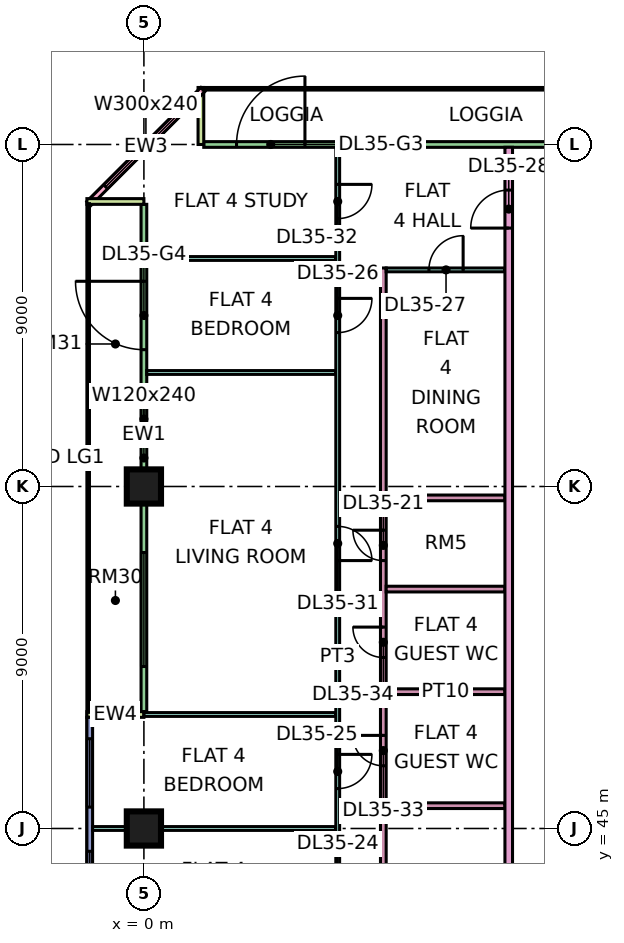
"""IFC4 building model, lengths in metres.
Left out: names, types, materials, properties, quantities, classifications, styles, units other than length and angle.
Written with IfcOpenShell. Run it as: python <this file> out.ifc"""

import sys

from ifc_helpers import new_model, si_unit, direction, frame, frame_2d, origin, origin_2d, place, context, subcontext, project, spatial, rectangle, extrude, element, fill, save


model = new_model("IFC4")
c1 = context("Model", 3, precision=1e-05, world=origin(), true_north=direction((0.0, 1.0)))
c2 = subcontext(c1, "Body", "Model", "MODEL_VIEW")
j1 = project(units=[si_unit("LENGTHUNIT", "METRE"), si_unit("PLANEANGLEUNIT", "RADIAN")], contexts=[c1])
p1 = place(None, origin())
s1 = spatial("IfcSite", under=j1, at=p1, CompositionType="ELEMENT")
p2 = place(p1, origin())
s2 = spatial("IfcBuilding", under=s1, at=p2, CompositionType="ELEMENT")
p3 = place(p2, frame((0.0, 0.0, 157.4)))
s3 = spatial("IfcBuildingStorey", under=s2, at=p3, CompositionType="ELEMENT", Elevation=157.4)
for number, where, z_axis, x_axis in (
    (1, (0.0, 45.0, 0.0), (0.0, 0.0, 1.0), (1.0, 0.0, 0.0)),
    (2, (0.0, 54.0, 0.0), (0.0, 0.0, 1.0), (1.0, 0.0, 0.0)),
):
    element("IfcColumn", number, at=place(p3, frame(where, z_axis=z_axis, x_axis=x_axis)), inside=s3, PredefinedType="COLUMN", context=c2, shape_type="SweptSolid", body=[
        extrude(rectangle(XDim=0.9, YDim=0.9, at=origin_2d()), origin(), (0.0, 0.0, 1.0), 3.75),
    ])
p4 = place(p3, frame((11.925, 63.0, 0.0), z_axis=(0.0, 0.0, 1.0), x_axis=(-1.0, 0.0, 0.0)))
e3 = element("IfcWall", 3, at=p4, inside=s3, PredefinedType="SOLIDWALL", context=c2, shape_type="SweptSolid", body=[
    extrude(rectangle(XDim=10.35, YDim=0.15, at=frame_2d((5.175, 0.0))), origin(), (0.0, 0.0, 1.0), 3.35),
])
p5 = place(p4, frame((7.688, 0.0, 0.0)))
e4 = element("IfcOpeningElement", 4, at=p5, cuts=e3, PredefinedType="OPENING", context=c2, shape_type="SweptSolid", body=[
    extrude(rectangle(XDim=1.8, YDim=2.4, at=frame_2d((0.9, 1.2))), frame((0.0, 0.085, 0.0), z_axis=(0.0, -1.0, 0.0), x_axis=(1.0, 0.0, 0.0)), (0.0, 0.0, 1.0), 0.17),
])
p6 = place(p3, frame((1.5, 64.5, 0.0), z_axis=(0.0, 0.0, 1.0), x_axis=(0.0, -1.0, 0.0)))
e5 = element("IfcWall", 5, at=p6, inside=s3, PredefinedType="SOLIDWALL", context=c2, shape_type="SweptSolid", body=[
    extrude(rectangle(XDim=1.5, YDim=0.15, at=frame_2d((0.75, 0.0))), origin(), (0.0, 0.0, 1.0), 3.35),
])
p7 = place(p3, frame((1.553, 64.447, 0.0), z_axis=(0.0, 0.0, 1.0), x_axis=(-0.707106781187, -0.707106781187, 0.0)))
e6 = element("IfcWall", 6, at=p7, inside=s3, PredefinedType="SOLIDWALL", context=c2, shape_type="SweptSolid", body=[
    extrude(rectangle(XDim=4.243, YDim=0.15, at=frame_2d((2.121, 0.0))), origin(), (0.0, 0.0, 1.0), 3.35),
])
p8 = place(p7, frame((0.621, 0.0, 0.45)))
e7 = element("IfcOpeningElement", 7, at=p8, cuts=e6, PredefinedType="OPENING", context=c2, shape_type="SweptSolid", body=[
    extrude(rectangle(XDim=3.0, YDim=2.4, at=frame_2d((1.5, 1.2))), frame((0.0, 0.085, 0.0), z_axis=(0.0, -1.0, 0.0), x_axis=(1.0, 0.0, 0.0)), (0.0, 0.0, 1.0), 0.17),
])
p9 = place(p3, frame((0.0, 61.425, 0.0), z_axis=(0.0, 0.0, 1.0), x_axis=(0.0, -1.0, 0.0)))
e8 = element("IfcWall", 8, at=p9, inside=s3, PredefinedType="SOLIDWALL", context=c2, shape_type="SweptSolid", body=[
    extrude(rectangle(XDim=13.35, YDim=0.15, at=frame_2d((6.675, 0.0))), origin(), (0.0, 0.0, 1.0), 3.35),
])
p10 = place(p9, frame((2.025, 0.0, 0.0)))
e9 = element("IfcOpeningElement", 9, at=p10, cuts=e8, PredefinedType="OPENING", context=c2, shape_type="SweptSolid", body=[
    extrude(rectangle(XDim=1.8, YDim=2.4, at=frame_2d((0.9, 1.2))), frame((0.0, 0.085, 0.0), z_axis=(0.0, -1.0, 0.0), x_axis=(1.0, 0.0, 0.0)), (0.0, 0.0, 1.0), 0.17),
])
p11 = place(p9, frame((5.05, 0.0, 0.45)))
e10 = element("IfcOpeningElement", 10, at=p11, cuts=e8, PredefinedType="OPENING", context=c2, shape_type="SweptSolid", body=[
    extrude(rectangle(XDim=1.2, YDim=2.4, at=frame_2d((0.6, 1.2))), frame((0.0, 0.085, 0.0), z_axis=(0.0, -1.0, 0.0), x_axis=(1.0, 0.0, 0.0)), (0.0, 0.0, 1.0), 0.17),
])
p12 = place(p9, frame((9.163, 0.0, 0.45)))
e11 = element("IfcOpeningElement", 11, at=p12, cuts=e8, PredefinedType="OPENING", context=c2, shape_type="SweptSolid", body=[
    extrude(rectangle(XDim=3.0, YDim=2.4, at=frame_2d((1.5, 1.2))), frame((0.0, 0.085, 0.0), z_axis=(0.0, -1.0, 0.0), x_axis=(1.0, 0.0, 0.0)), (0.0, 0.0, 1.0), 0.17),
])
for number, where, z_axis, x_axis in (
    (12, (-1.5, 61.5, 0.0), (0.0, 0.0, 1.0), (1.0, 0.0, 0.0)),
    (13, (-1.5, 48.0, 0.0), (0.0, 0.0, 1.0), (1.0, 0.0, 0.0)),
):
    element("IfcWall", number, at=place(p3, frame(where, z_axis=z_axis, x_axis=x_axis)), inside=s3, PredefinedType="SOLIDWALL", context=c2, shape_type="SweptSolid", body=[
        extrude(rectangle(XDim=1.5, YDim=0.15, at=frame_2d((0.75, 0.0))), origin(), (0.0, 0.0, 1.0), 3.35),
    ])
p13 = place(p3, frame((-1.425, 47.925, 0.0), z_axis=(0.0, 0.0, 1.0), x_axis=(0.0, -1.0, 0.0)))
e14 = element("IfcWall", 14, at=p13, inside=s3, PredefinedType="SOLIDWALL", context=c2, shape_type="SweptSolid", body=[
    extrude(rectangle(XDim=11.85, YDim=0.15, at=frame_2d((5.925, 0.0))), origin(), (0.0, 0.0, 1.0), 3.35),
])
p14 = place(p13, frame((0.562, 0.0, 0.45)))
e15 = element("IfcOpeningElement", 15, at=p14, cuts=e14, PredefinedType="OPENING", context=c2, shape_type="SweptSolid", body=[
    extrude(rectangle(XDim=1.8, YDim=2.4, at=frame_2d((0.9, 1.2))), frame((0.0, 0.085, 0.0), z_axis=(0.0, -1.0, 0.0), x_axis=(1.0, 0.0, 0.0)), (0.0, 0.0, 1.0), 0.17),
])
p15 = place(p13, frame((3.525, 0.0, 0.45)))
e16 = element("IfcOpeningElement", 16, at=p15, cuts=e14, PredefinedType="OPENING", context=c2, shape_type="SweptSolid", body=[
    extrude(rectangle(XDim=1.8, YDim=2.4, at=frame_2d((0.9, 1.2))), frame((0.0, 0.085, 0.0), z_axis=(0.0, -1.0, 0.0), x_axis=(1.0, 0.0, 0.0)), (0.0, 0.0, 1.0), 0.17),
])
p16 = place(p13, frame((6.525, 0.0, 0.45)))
e17 = element("IfcOpeningElement", 17, at=p16, cuts=e14, PredefinedType="OPENING", context=c2, shape_type="SweptSolid", body=[
    extrude(rectangle(XDim=1.8, YDim=2.4, at=frame_2d((0.9, 1.2))), frame((0.0, 0.085, 0.0), z_axis=(0.0, -1.0, 0.0), x_axis=(1.0, 0.0, 0.0)), (0.0, 0.0, 1.0), 0.17),
])
p17 = place(p13, frame((9.488, 0.0, 0.45)))
e18 = element("IfcOpeningElement", 18, at=p17, cuts=e14, PredefinedType="OPENING", context=c2, shape_type="SweptSolid", body=[
    extrude(rectangle(XDim=1.8, YDim=2.4, at=frame_2d((0.9, 1.2))), frame((0.0, 0.085, 0.0), z_axis=(0.0, -1.0, 0.0), x_axis=(1.0, 0.0, 0.0)), (0.0, 0.0, 1.0), 0.17),
])
p18 = place(p3, frame((-1.351, 45.0, 0.0), z_axis=(0.0, 0.0, 1.0), x_axis=(1.0, 0.0, 0.0)))
e19 = element("IfcWall", 19, at=p18, inside=s3, PredefinedType="PARTITIONING", context=c2, shape_type="SweptSolid", body=[
    extrude(rectangle(XDim=6.401, YDim=0.1, at=frame_2d((3.201, 0.0))), origin(), (0.0, 0.0, 1.0), 3.35),
])
p19 = place(p3, frame((0.0, 48.0, 0.0), z_axis=(0.0, 0.0, 1.0), x_axis=(1.0, 0.0, 0.0)))
e20 = element("IfcWall", 20, at=p19, inside=s3, PredefinedType="PARTITIONING", context=c2, shape_type="SweptSolid", body=[
    extrude(rectangle(XDim=5.05, YDim=0.1, at=frame_2d((2.525, 0.0))), origin(), (0.0, 0.0, 1.0), 3.35),
])
for number, where, z_axis, x_axis in (
    (21, (0.074, 57.0, 0.0), (0.0, 0.0, 1.0), (1.0, 0.0, 0.0)),
    (22, (0.074, 60.0, 0.0), (0.0, 0.0, 1.0), (1.0, 0.0, 0.0)),
):
    element("IfcWall", number, at=place(p3, frame(where, z_axis=z_axis, x_axis=x_axis)), inside=s3, PredefinedType="PARTITIONING", context=c2, shape_type="SweptSolid", body=[
        extrude(rectangle(XDim=4.976, YDim=0.1, at=frame_2d((2.488, 0.0))), origin(), (0.0, 0.0, 1.0), 3.35),
    ])
p20 = place(p3, frame((5.1, 36.1, 0.0), z_axis=(0.0, 0.0, 1.0), x_axis=(0.0, 1.0, 0.0)))
e23 = element("IfcWall", 23, at=p20, inside=s3, PredefinedType="PARTITIONING", context=c2, shape_type="SweptSolid", body=[
    extrude(rectangle(XDim=26.826, YDim=0.1, at=frame_2d((13.413, 0.0))), origin(), (0.0, 0.0, 1.0), 3.35),
])
p21 = place(p20, frame((0.95, 0.0, 0.0)))
e24 = element("IfcOpeningElement", 24, at=p21, cuts=e23, PredefinedType="OPENING", context=c2, shape_type="SweptSolid", body=[
    extrude(rectangle(XDim=0.9, YDim=2.1, at=frame_2d((0.45, 1.05))), frame((0.0, 0.06, 0.0), z_axis=(0.0, -1.0, 0.0), x_axis=(1.0, 0.0, 0.0)), (0.0, 0.0, 1.0), 0.12),
])
p22 = place(p20, frame((3.95, 0.0, 0.0)))
e25 = element("IfcOpeningElement", 25, at=p22, cuts=e23, PredefinedType="OPENING", context=c2, shape_type="SweptSolid", body=[
    extrude(rectangle(XDim=0.9, YDim=2.1, at=frame_2d((0.45, 1.05))), frame((0.0, 0.06, 0.0), z_axis=(0.0, -1.0, 0.0), x_axis=(1.0, 0.0, 0.0)), (0.0, 0.0, 1.0), 0.12),
])
p23 = place(p20, frame((6.95, 0.0, 0.0)))
e26 = element("IfcOpeningElement", 26, at=p23, cuts=e23, PredefinedType="OPENING", context=c2, shape_type="SweptSolid", body=[
    extrude(rectangle(XDim=0.9, YDim=2.1, at=frame_2d((0.45, 1.05))), frame((0.0, 0.06, 0.0), z_axis=(0.0, -1.0, 0.0), x_axis=(1.0, 0.0, 0.0)), (0.0, 0.0, 1.0), 0.12),
])
p24 = place(p20, frame((9.95, 0.0, 0.0)))
e27 = element("IfcOpeningElement", 27, at=p24, cuts=e23, PredefinedType="OPENING", context=c2, shape_type="SweptSolid", body=[
    extrude(rectangle(XDim=0.9, YDim=2.1, at=frame_2d((0.45, 1.05))), frame((0.0, 0.06, 0.0), z_axis=(0.0, -1.0, 0.0), x_axis=(1.0, 0.0, 0.0)), (0.0, 0.0, 1.0), 0.12),
])
p25 = place(p20, frame((21.95, 0.0, 0.0)))
e28 = element("IfcOpeningElement", 28, at=p25, cuts=e23, PredefinedType="OPENING", context=c2, shape_type="SweptSolid", body=[
    extrude(rectangle(XDim=0.9, YDim=2.1, at=frame_2d((0.45, 1.05))), frame((0.0, 0.06, 0.0), z_axis=(0.0, -1.0, 0.0), x_axis=(1.0, 0.0, 0.0)), (0.0, 0.0, 1.0), 0.12),
])
p26 = place(p20, frame((15.95, 0.0, 0.0)))
e29 = element("IfcOpeningElement", 29, at=p26, cuts=e23, PredefinedType="OPENING", context=c2, shape_type="SweptSolid", body=[
    extrude(rectangle(XDim=0.9, YDim=2.1, at=frame_2d((0.45, 1.05))), frame((0.0, 0.06, 0.0), z_axis=(0.0, -1.0, 0.0), x_axis=(1.0, 0.0, 0.0)), (0.0, 0.0, 1.0), 0.12),
])
p27 = place(p20, frame((24.95, 0.0, 0.0)))
e30 = element("IfcOpeningElement", 30, at=p27, cuts=e23, PredefinedType="OPENING", context=c2, shape_type="SweptSolid", body=[
    extrude(rectangle(XDim=0.9, YDim=2.1, at=frame_2d((0.45, 1.05))), frame((0.0, 0.06, 0.0), z_axis=(0.0, -1.0, 0.0), x_axis=(1.0, 0.0, 0.0)), (0.0, 0.0, 1.0), 0.12),
])
p28 = place(p3, frame((6.3, 36.1, 0.0), z_axis=(0.0, 0.0, 1.0), x_axis=(0.0, 1.0, 0.0)))
e31 = element("IfcWall", 31, at=p28, inside=s3, PredefinedType="PARTITIONING", context=c2, shape_type="SweptSolid", body=[
    extrude(rectangle(XDim=23.65, YDim=0.15, at=frame_2d((11.825, 0.0))), origin(), (0.0, 0.0, 1.0), 3.35),
])
p29 = place(p28, frame((15.95, 0.0, 0.0)))
e32 = element("IfcOpeningElement", 32, at=p29, cuts=e31, PredefinedType="OPENING", context=c2, shape_type="SweptSolid", body=[
    extrude(rectangle(XDim=0.8, YDim=2.1, at=frame_2d((0.4, 1.05))), frame((0.0, 0.085, 0.0), z_axis=(0.0, -1.0, 0.0), x_axis=(1.0, 0.0, 0.0)), (0.0, 0.0, 1.0), 0.17),
])
p30 = place(p28, frame((5.75, 0.0, 0.0)))
e33 = element("IfcOpeningElement", 33, at=p30, cuts=e31, PredefinedType="OPENING", context=c2, shape_type="SweptSolid", body=[
    extrude(rectangle(XDim=0.9, YDim=2.1, at=frame_2d((0.45, 1.05))), frame((0.0, 0.085, 0.0), z_axis=(0.0, -1.0, 0.0), x_axis=(1.0, 0.0, 0.0)), (0.0, 0.0, 1.0), 0.17),
])
p31 = place(p28, frame((0.95, 0.0, 0.0)))
e34 = element("IfcOpeningElement", 34, at=p31, cuts=e31, PredefinedType="OPENING", context=c2, shape_type="SweptSolid", body=[
    extrude(rectangle(XDim=0.8, YDim=2.1, at=frame_2d((0.4, 1.05))), frame((0.0, 0.085, 0.0), z_axis=(0.0, -1.0, 0.0), x_axis=(1.0, 0.0, 0.0)), (0.0, 0.0, 1.0), 0.17),
])
p32 = place(p28, frame((10.55, 0.0, 0.0)))
e35 = element("IfcOpeningElement", 35, at=p32, cuts=e31, PredefinedType="OPENING", context=c2, shape_type="SweptSolid", body=[
    extrude(rectangle(XDim=0.8, YDim=2.1, at=frame_2d((0.4, 1.05))), frame((0.0, 0.085, 0.0), z_axis=(0.0, -1.0, 0.0), x_axis=(1.0, 0.0, 0.0)), (0.0, 0.0, 1.0), 0.17),
])
p33 = place(p28, frame((13.4, 0.0, 0.0)))
e36 = element("IfcOpeningElement", 36, at=p33, cuts=e31, PredefinedType="OPENING", context=c2, shape_type="SweptSolid", body=[
    extrude(rectangle(XDim=0.8, YDim=2.1, at=frame_2d((0.4, 1.05))), frame((0.0, 0.085, 0.0), z_axis=(0.0, -1.0, 0.0), x_axis=(1.0, 0.0, 0.0)), (0.0, 0.0, 1.0), 0.17),
])
for number, where, z_axis, x_axis in (
    (37, (6.375, 45.6, 0.0), (0.0, 0.0, 1.0), (1.0, 0.0, 0.0)),
    (38, (6.375, 48.6, 0.0), (0.0, 0.0, 1.0), (1.0, 0.0, 0.0)),
    (39, (6.375, 51.3, 0.0), (0.0, 0.0, 1.0), (1.0, 0.0, 0.0)),
    (40, (6.375, 53.7, 0.0), (0.0, 0.0, 1.0), (1.0, 0.0, 0.0)),
):
    element("IfcWall", number, at=place(p3, frame(where, z_axis=z_axis, x_axis=x_axis)), inside=s3, PredefinedType="PARTITIONING", context=c2, shape_type="SweptSolid", body=[
        extrude(rectangle(XDim=3.125, YDim=0.15, at=frame_2d((1.562, 0.0))), origin(), (0.0, 0.0, 1.0), 3.35),
    ])
p34 = place(p3, frame((6.375, 59.7, 0.0), z_axis=(0.0, 0.0, 1.0), x_axis=(1.0, 0.0, 0.0)))
e41 = element("IfcWall", 41, at=p34, inside=s3, PredefinedType="PARTITIONING", context=c2, shape_type="SweptSolid", body=[
    extrude(rectangle(XDim=3.125, YDim=0.1, at=frame_2d((1.562, 0.0))), origin(), (0.0, 0.0, 1.0), 3.35),
])
p35 = place(p34, frame((1.125, 0.0, 0.0)))
e42 = element("IfcOpeningElement", 42, at=p35, cuts=e41, PredefinedType="OPENING", context=c2, shape_type="SweptSolid", body=[
    extrude(rectangle(XDim=0.9, YDim=2.1, at=frame_2d((0.45, 1.05))), frame((0.0, 0.06, 0.0), z_axis=(0.0, -1.0, 0.0), x_axis=(1.0, 0.0, 0.0)), (0.0, 0.0, 1.0), 0.12),
])
p36 = place(p3, frame((9.6, 20.0, 0.0), z_axis=(0.0, 0.0, 1.0), x_axis=(0.0, 1.0, 0.0)))
e43 = element("IfcWall", 43, at=p36, inside=s3, PredefinedType="PARTITIONING", context=c2, shape_type="SweptSolid", body=[
    extrude(rectangle(XDim=42.926, YDim=0.2, at=frame_2d((21.463, 0.0))), origin(), (0.0, 0.0, 1.0), 3.35),
])
p37 = place(p36, frame((40.8, 0.0, 0.0)))
e44 = element("IfcOpeningElement", 44, at=p37, cuts=e43, PredefinedType="OPENING", context=c2, shape_type="SweptSolid", body=[
    extrude(rectangle(XDim=1.0, YDim=2.1, at=frame_2d((0.5, 1.05))), frame((0.0, 0.11, 0.0), z_axis=(0.0, -1.0, 0.0), x_axis=(1.0, 0.0, 0.0)), (0.0, 0.0, 1.0), 0.22),
])
p38 = place(p36, frame((0.6, 0.0, 0.0)))
e45 = element("IfcOpeningElement", 45, at=p38, cuts=e43, PredefinedType="OPENING", context=c2, shape_type="SweptSolid", body=[
    extrude(rectangle(XDim=1.2, YDim=2.1, at=frame_2d((0.6, 1.05))), frame((0.0, 0.11, 0.0), z_axis=(0.0, -1.0, 0.0), x_axis=(1.0, 0.0, 0.0)), (0.0, 0.0, 1.0), 0.22),
])
p39 = place(p36, frame((3.9, 0.0, 0.0)))
e46 = element("IfcOpeningElement", 46, at=p39, cuts=e43, PredefinedType="OPENING", context=c2, shape_type="SweptSolid", body=[
    extrude(rectangle(XDim=1.0, YDim=2.1, at=frame_2d((0.5, 1.05))), frame((0.0, 0.11, 0.0), z_axis=(0.0, -1.0, 0.0), x_axis=(1.0, 0.0, 0.0)), (0.0, 0.0, 1.0), 0.22),
])
p40 = place(p5, frame((1.8, 0.0, 0.0), z_axis=(0.0, 0.0, 1.0), x_axis=(-1.0, 0.0, 0.0)))
e47 = element("IfcDoor", 47, at=p40, inside=s3, OperationType="DOUBLE_DOOR_SINGLE_SWING", PredefinedType="DOOR", context=c2, shape_type="SweptSolid", body=[
    extrude(rectangle(XDim=1.8, YDim=2.4, at=frame_2d((0.9, 1.2))), frame((0.0, 0.025, 0.0), z_axis=(0.0, -1.0, 0.0), x_axis=(1.0, 0.0, 0.0)), (0.0, 0.0, 1.0), 0.05),
])
fill(e4, e47)
p41 = place(p8, origin())
e48 = element("IfcWindow", 48, at=p41, inside=s3, PartitioningType="SINGLE_PANEL", PredefinedType="WINDOW", context=c2, shape_type="SweptSolid", body=[
    extrude(rectangle(XDim=3.0, YDim=2.4, at=frame_2d((1.5, 1.2))), frame((0.0, 0.03, 0.0), z_axis=(0.0, -1.0, 0.0), x_axis=(1.0, 0.0, 0.0)), (0.0, 0.0, 1.0), 0.06),
])
fill(e7, e48)
p42 = place(p10, frame((1.8, 0.0, 0.0), z_axis=(0.0, 0.0, 1.0), x_axis=(-1.0, 0.0, 0.0)))
e49 = element("IfcDoor", 49, at=p42, inside=s3, OperationType="DOUBLE_DOOR_SINGLE_SWING", PredefinedType="DOOR", context=c2, shape_type="SweptSolid", body=[
    extrude(rectangle(XDim=1.8, YDim=2.4, at=frame_2d((0.9, 1.2))), frame((0.0, 0.025, 0.0), z_axis=(0.0, -1.0, 0.0), x_axis=(1.0, 0.0, 0.0)), (0.0, 0.0, 1.0), 0.05),
])
fill(e9, e49)
p43 = place(p11, origin())
e50 = element("IfcWindow", 50, at=p43, inside=s3, PartitioningType="SINGLE_PANEL", PredefinedType="WINDOW", context=c2, shape_type="SweptSolid", body=[
    extrude(rectangle(XDim=1.2, YDim=2.4, at=frame_2d((0.6, 1.2))), frame((0.0, 0.03, 0.0), z_axis=(0.0, -1.0, 0.0), x_axis=(1.0, 0.0, 0.0)), (0.0, 0.0, 1.0), 0.06),
])
fill(e10, e50)
p44 = place(p12, origin())
e51 = element("IfcWindow", 51, at=p44, inside=s3, PartitioningType="SINGLE_PANEL", PredefinedType="WINDOW", context=c2, shape_type="SweptSolid", body=[
    extrude(rectangle(XDim=3.0, YDim=2.4, at=frame_2d((1.5, 1.2))), frame((0.0, 0.03, 0.0), z_axis=(0.0, -1.0, 0.0), x_axis=(1.0, 0.0, 0.0)), (0.0, 0.0, 1.0), 0.06),
])
fill(e11, e51)
p45 = place(p14, origin())
e52 = element("IfcWindow", 52, at=p45, inside=s3, PartitioningType="SINGLE_PANEL", PredefinedType="WINDOW", context=c2, shape_type="SweptSolid", body=[
    extrude(rectangle(XDim=1.8, YDim=2.4, at=frame_2d((0.9, 1.2))), frame((0.0, 0.03, 0.0), z_axis=(0.0, -1.0, 0.0), x_axis=(1.0, 0.0, 0.0)), (0.0, 0.0, 1.0), 0.06),
])
fill(e15, e52)
p46 = place(p15, origin())
e53 = element("IfcWindow", 53, at=p46, inside=s3, PartitioningType="SINGLE_PANEL", PredefinedType="WINDOW", context=c2, shape_type="SweptSolid", body=[
    extrude(rectangle(XDim=1.8, YDim=2.4, at=frame_2d((0.9, 1.2))), frame((0.0, 0.03, 0.0), z_axis=(0.0, -1.0, 0.0), x_axis=(1.0, 0.0, 0.0)), (0.0, 0.0, 1.0), 0.06),
])
fill(e16, e53)
p47 = place(p29, frame((0.8, 0.0, 0.0), z_axis=(0.0, 0.0, 1.0), x_axis=(-1.0, 0.0, 0.0)))
e54 = element("IfcDoor", 54, at=p47, inside=s3, OperationType="SINGLE_SWING_RIGHT", PredefinedType="DOOR", context=c2, shape_type="SweptSolid", body=[
    extrude(rectangle(XDim=0.8, YDim=2.1, at=frame_2d((0.4, 1.05))), frame((0.0, 0.025, 0.0), z_axis=(0.0, -1.0, 0.0), x_axis=(1.0, 0.0, 0.0)), (0.0, 0.0, 1.0), 0.05),
])
fill(e32, e54)
p48 = place(p24, origin())
e55 = element("IfcDoor", 55, at=p48, inside=s3, OperationType="SINGLE_SWING_RIGHT", PredefinedType="DOOR", context=c2, shape_type="SweptSolid", body=[
    extrude(rectangle(XDim=0.9, YDim=2.1, at=frame_2d((0.45, 1.05))), frame((0.0, 0.025, 0.0), z_axis=(0.0, -1.0, 0.0), x_axis=(1.0, 0.0, 0.0)), (0.0, 0.0, 1.0), 0.05),
])
fill(e27, e55)
p49 = place(p25, origin())
e56 = element("IfcDoor", 56, at=p49, inside=s3, OperationType="SINGLE_SWING_RIGHT", PredefinedType="DOOR", context=c2, shape_type="SweptSolid", body=[
    extrude(rectangle(XDim=0.9, YDim=2.1, at=frame_2d((0.45, 1.05))), frame((0.0, 0.025, 0.0), z_axis=(0.0, -1.0, 0.0), x_axis=(1.0, 0.0, 0.0)), (0.0, 0.0, 1.0), 0.05),
])
fill(e28, e56)
p50 = place(p35, frame((0.9, 0.0, 0.0), z_axis=(0.0, 0.0, 1.0), x_axis=(-1.0, 0.0, 0.0)))
e57 = element("IfcDoor", 57, at=p50, inside=s3, OperationType="SINGLE_SWING_RIGHT", PredefinedType="DOOR", context=c2, shape_type="SweptSolid", body=[
    extrude(rectangle(XDim=0.9, YDim=2.1, at=frame_2d((0.45, 1.05))), frame((0.0, 0.025, 0.0), z_axis=(0.0, -1.0, 0.0), x_axis=(1.0, 0.0, 0.0)), (0.0, 0.0, 1.0), 0.05),
])
fill(e42, e57)
p51 = place(p37, origin())
e58 = element("IfcDoor", 58, at=p51, inside=s3, OperationType="SINGLE_SWING_LEFT", PredefinedType="DOOR", context=c2, shape_type="SweptSolid", body=[
    extrude(rectangle(XDim=1.0, YDim=2.1, at=frame_2d((0.5, 1.05))), frame((0.0, 0.025, 0.0), z_axis=(0.0, -1.0, 0.0), x_axis=(1.0, 0.0, 0.0)), (0.0, 0.0, 1.0), 0.05),
])
fill(e44, e58)
p52 = place(p26, frame((0.9, 0.0, 0.0), z_axis=(0.0, 0.0, 1.0), x_axis=(-1.0, 0.0, 0.0)))
e59 = element("IfcDoor", 59, at=p52, inside=s3, OperationType="SINGLE_SWING_LEFT", PredefinedType="DOOR", context=c2, shape_type="SweptSolid", body=[
    extrude(rectangle(XDim=0.9, YDim=2.1, at=frame_2d((0.45, 1.05))), frame((0.0, 0.025, 0.0), z_axis=(0.0, -1.0, 0.0), x_axis=(1.0, 0.0, 0.0)), (0.0, 0.0, 1.0), 0.05),
])
fill(e29, e59)
p53 = place(p27, origin())
e60 = element("IfcDoor", 60, at=p53, inside=s3, OperationType="SINGLE_SWING_RIGHT", PredefinedType="DOOR", context=c2, shape_type="SweptSolid", body=[
    extrude(rectangle(XDim=0.9, YDim=2.1, at=frame_2d((0.45, 1.05))), frame((0.0, 0.025, 0.0), z_axis=(0.0, -1.0, 0.0), x_axis=(1.0, 0.0, 0.0)), (0.0, 0.0, 1.0), 0.05),
])
fill(e30, e60)
p54 = place(p32, frame((0.8, 0.0, 0.0), z_axis=(0.0, 0.0, 1.0), x_axis=(-1.0, 0.0, 0.0)))
e61 = element("IfcDoor", 61, at=p54, inside=s3, OperationType="SINGLE_SWING_RIGHT", PredefinedType="DOOR", context=c2, shape_type="SweptSolid", body=[
    extrude(rectangle(XDim=0.8, YDim=2.1, at=frame_2d((0.4, 1.05))), frame((0.0, 0.025, 0.0), z_axis=(0.0, -1.0, 0.0), x_axis=(1.0, 0.0, 0.0)), (0.0, 0.0, 1.0), 0.05),
])
fill(e35, e61)
p55 = place(p33, frame((0.8, 0.0, 0.0), z_axis=(0.0, 0.0, 1.0), x_axis=(-1.0, 0.0, 0.0)))
e62 = element("IfcDoor", 62, at=p55, inside=s3, OperationType="SINGLE_SWING_RIGHT", PredefinedType="DOOR", context=c2, shape_type="SweptSolid", body=[
    extrude(rectangle(XDim=0.8, YDim=2.1, at=frame_2d((0.4, 1.05))), frame((0.0, 0.025, 0.0), z_axis=(0.0, -1.0, 0.0), x_axis=(1.0, 0.0, 0.0)), (0.0, 0.0, 1.0), 0.05),
])
fill(e36, e62)
save(model, sys.argv[1])
